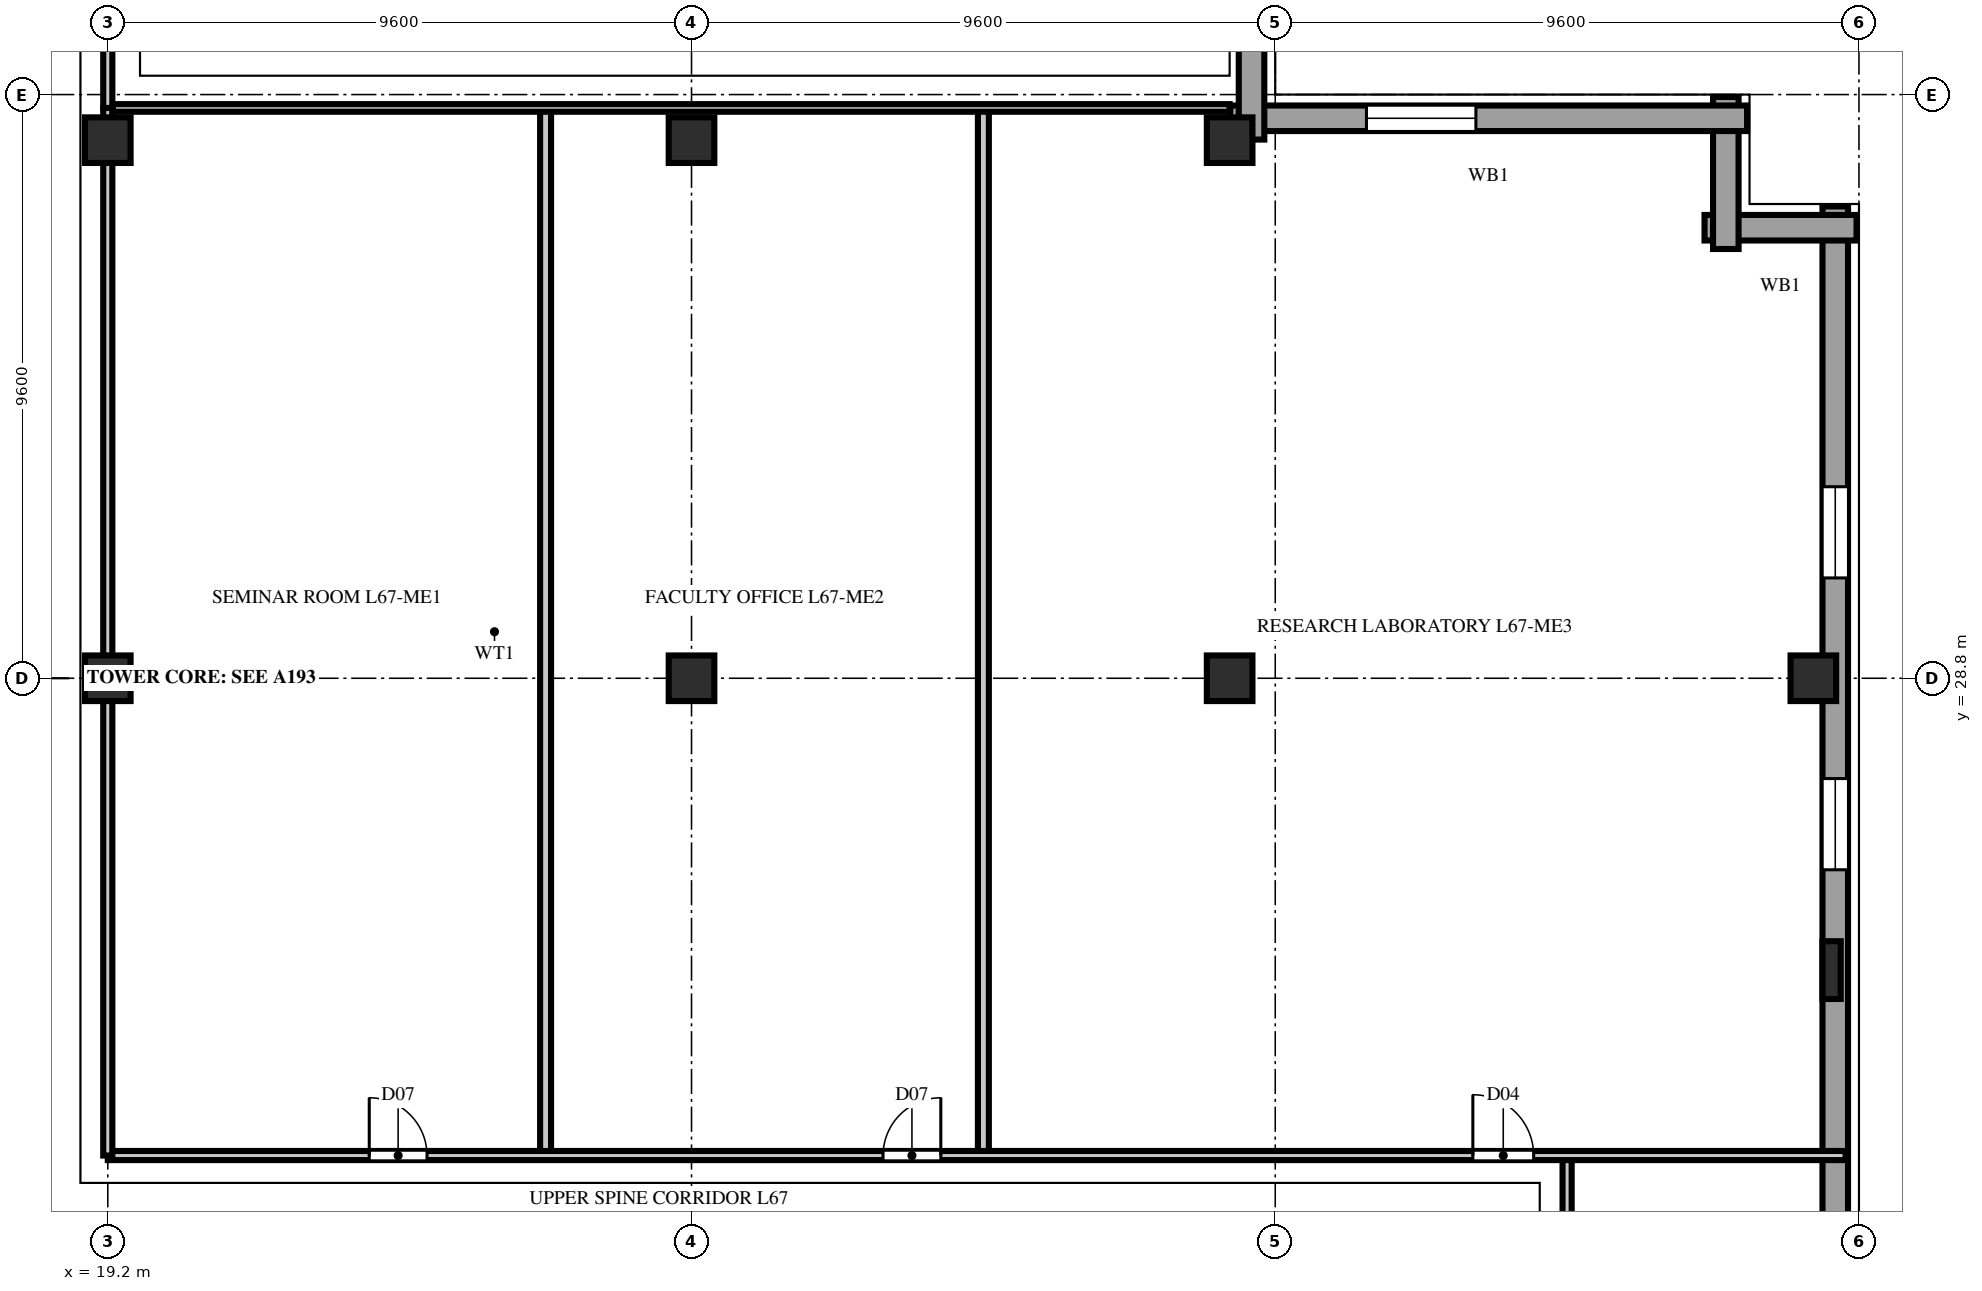
"""IFC4 building model, lengths in metres.
Left out: names, types, materials, properties, quantities, classifications, styles, units other than length and angle.
Written with IfcOpenShell. Run it as: python <this file> out.ifc"""

import sys

from ifc_helpers import new_model, si_unit, direction, frame, frame_2d, origin, origin_2d, place, context, subcontext, project, spatial, rectangle, extrude, element, fill, save


model = new_model("IFC4")
c1 = context("Model", 3, precision=1e-05, world=origin(), true_north=direction((0.0, 1.0)))
c2 = subcontext(c1, "Body", "Model", "MODEL_VIEW")
j1 = project(units=[si_unit("LENGTHUNIT", "METRE"), si_unit("PLANEANGLEUNIT", "RADIAN")], contexts=[c1])
p1 = place(None, origin())
s1 = spatial("IfcSite", under=j1, at=p1, CompositionType="ELEMENT")
p2 = place(p1, origin())
s2 = spatial("IfcBuilding", under=s1, at=p2, CompositionType="ELEMENT")
p3 = place(p2, frame((0.0, 0.0, 265.8)))
s3 = spatial("IfcBuildingStorey", under=s2, at=p3, CompositionType="ELEMENT", Elevation=265.8)
for number, where, z_axis, x_axis in (
    (1, (19.2, 28.8, 0.0), (0.0, 0.0, 1.0), (1.0, 0.0, 0.0)),
    (2, (19.2, 37.65, 0.0), (0.0, 0.0, 1.0), (1.0, 0.0, 0.0)),
    (3, (28.8, 28.8, 0.0), (0.0, 0.0, 1.0), (1.0, 0.0, 0.0)),
    (4, (28.8, 37.65, 0.0), (0.0, 0.0, 1.0), (1.0, 0.0, 0.0)),
    (5, (37.65, 28.8, 0.0), (0.0, 0.0, 1.0), (1.0, 0.0, 0.0)),
    (6, (37.65, 37.65, 0.0), (0.0, 0.0, 1.0), (1.0, 0.0, 0.0)),
    (7, (47.25, 28.8, 0.0), (0.0, 0.0, 1.0), (1.0, 0.0, 0.0)),
):
    element("IfcColumn", number, at=place(p3, frame(where, z_axis=z_axis, x_axis=x_axis)), inside=s3, PredefinedType="COLUMN", context=c2, shape_type="SweptSolid", body=[
        extrude(rectangle(XDim=0.75, YDim=0.75, at=origin_2d()), origin(), (0.0, 0.0, 1.0), 3.8),
    ])
p4 = place(p3, frame((47.55, 24.0, 0.0), z_axis=(0.0, 0.0, 1.0), x_axis=(0.0, 1.0, 0.0)))
e8 = element("IfcColumn", 8, at=p4, inside=s3, PredefinedType="PILASTER", context=c2, shape_type="SweptSolid", body=[
    extrude(rectangle(XDim=0.95, YDim=0.3, at=origin_2d()), origin(), (0.0, 0.0, 1.0), 3.8),
])
p5 = place(p3, frame((47.61, 1.84, 0.0), z_axis=(0.0, 0.0, 1.0), x_axis=(0.0, 1.0, 0.0)))
e9 = element("IfcWall", 9, at=p5, inside=s3, PredefinedType="SOLIDWALL", context=c2, shape_type="SweptSolid", body=[
    extrude(rectangle(XDim=34.72, YDim=0.42, at=frame_2d((17.36, 0.0))), origin(), (0.0, 0.0, 1.0), 3.54),
])
p6 = place(p5, frame((4.61, 0.0, 0.85)))
e10 = element("IfcOpeningElement", 10, at=p6, cuts=e9, PredefinedType="OPENING", context=c2, shape_type="SweptSolid", body=[
    extrude(rectangle(XDim=1.5, YDim=1.85, at=frame_2d((0.75, 0.925))), frame((0.0, 0.222, 0.0), z_axis=(0.0, -1.0, 0.0), x_axis=(1.0, 0.0, 0.0)), (0.0, 0.0, 1.0), 0.444),
])
p7 = place(p5, frame((9.41, 0.0, 0.85)))
e11 = element("IfcOpeningElement", 11, at=p7, cuts=e9, PredefinedType="OPENING", context=c2, shape_type="SweptSolid", body=[
    extrude(rectangle(XDim=1.5, YDim=1.85, at=frame_2d((0.75, 0.925))), frame((0.0, 0.222, 0.0), z_axis=(0.0, -1.0, 0.0), x_axis=(1.0, 0.0, 0.0)), (0.0, 0.0, 1.0), 0.444),
])
p8 = place(p5, frame((14.21, 0.0, 0.85)))
e12 = element("IfcOpeningElement", 12, at=p8, cuts=e9, PredefinedType="OPENING", context=c2, shape_type="SweptSolid", body=[
    extrude(rectangle(XDim=1.5, YDim=1.85, at=frame_2d((0.75, 0.925))), frame((0.0, 0.222, 0.0), z_axis=(0.0, -1.0, 0.0), x_axis=(1.0, 0.0, 0.0)), (0.0, 0.0, 1.0), 0.444),
])
p9 = place(p5, frame((23.81, 0.0, 0.85)))
e13 = element("IfcOpeningElement", 13, at=p9, cuts=e9, PredefinedType="OPENING", context=c2, shape_type="SweptSolid", body=[
    extrude(rectangle(XDim=1.5, YDim=1.85, at=frame_2d((0.75, 0.925))), frame((0.0, 0.222, 0.0), z_axis=(0.0, -1.0, 0.0), x_axis=(1.0, 0.0, 0.0)), (0.0, 0.0, 1.0), 0.444),
])
p10 = place(p5, frame((28.61, 0.0, 0.85)))
e14 = element("IfcOpeningElement", 14, at=p10, cuts=e9, PredefinedType="OPENING", context=c2, shape_type="SweptSolid", body=[
    extrude(rectangle(XDim=1.5, YDim=1.85, at=frame_2d((0.75, 0.925))), frame((0.0, 0.222, 0.0), z_axis=(0.0, -1.0, 0.0), x_axis=(1.0, 0.0, 0.0)), (0.0, 0.0, 1.0), 0.444),
])
for number, where, z_axis, x_axis in (
    (15, (47.96, 36.21, 0.0), (0.0, 0.0, 1.0), (-1.0, 0.0, 0.0)),
    (16, (45.81, 35.86, 0.0), (0.0, 0.0, 1.0), (0.0, 1.0, 0.0)),
):
    element("IfcWall", number, at=place(p3, frame(where, z_axis=z_axis, x_axis=x_axis)), inside=s3, PredefinedType="SOLIDWALL", context=c2, shape_type="SweptSolid", body=[
        extrude(rectangle(XDim=2.5, YDim=0.42, at=frame_2d((1.25, 0.0))), origin(), (0.0, 0.0, 1.0), 3.54),
    ])
p11 = place(p3, frame((46.16, 38.01, 0.0), z_axis=(0.0, 0.0, 1.0), x_axis=(-1.0, 0.0, 0.0)))
e17 = element("IfcWall", 17, at=p11, inside=s3, PredefinedType="SOLIDWALL", context=c2, shape_type="SweptSolid", body=[
    extrude(rectangle(XDim=8.5, YDim=0.42, at=frame_2d((4.25, 0.0))), origin(), (0.0, 0.0, 1.0), 3.54),
])
p12 = place(p11, frame((4.46, 0.0, 0.85)))
e18 = element("IfcOpeningElement", 18, at=p12, cuts=e17, PredefinedType="OPENING", context=c2, shape_type="SweptSolid", body=[
    extrude(rectangle(XDim=1.8, YDim=1.85, at=frame_2d((0.9, 0.925))), frame((0.0, 0.222, 0.0), z_axis=(0.0, -1.0, 0.0), x_axis=(1.0, 0.0, 0.0)), (0.0, 0.0, 1.0), 0.444),
])
p13 = place(p3, frame((38.01, 37.66, 0.0), z_axis=(0.0, 0.0, 1.0), x_axis=(0.0, 1.0, 0.0)))
e19 = element("IfcWall", 19, at=p13, inside=s3, PredefinedType="SOLIDWALL", context=c2, shape_type="SweptSolid", body=[
    extrude(rectangle(XDim=8.5, YDim=0.42, at=frame_2d((4.25, 0.0))), origin(), (0.0, 0.0, 1.0), 3.54),
])
p14 = place(p13, frame((2.24, 0.0, 0.85)))
e20 = element("IfcOpeningElement", 20, at=p14, cuts=e19, PredefinedType="OPENING", context=c2, shape_type="SweptSolid", body=[
    extrude(rectangle(XDim=1.8, YDim=1.85, at=frame_2d((0.9, 0.925))), frame((0.0, 0.222, 0.0), z_axis=(0.0, -1.0, 0.0), x_axis=(1.0, 0.0, 0.0)), (0.0, 0.0, 1.0), 0.444),
])
p15 = place(p3, frame((43.2, 18.1, 0.0), z_axis=(0.0, 0.0, 1.0), x_axis=(0.0, 1.0, 0.0)))
e21 = element("IfcWall", 21, at=p15, inside=s3, PredefinedType="PARTITIONING", context=c2, shape_type="SweptSolid", body=[
    extrude(rectangle(XDim=2.85, YDim=0.15, at=frame_2d((1.425, 0.0))), origin(), (0.0, 0.0, 1.0), 3.54),
])
for number, where, z_axis, x_axis in (
    (22, (26.4, 20.95, 0.0), (0.0, 0.0, 1.0), (0.0, 1.0, 0.0)),
    (23, (33.6, 20.95, 0.0), (0.0, 0.0, 1.0), (0.0, 1.0, 0.0)),
):
    element("IfcWall", number, at=place(p3, frame(where, z_axis=z_axis, x_axis=x_axis)), inside=s3, PredefinedType="PARTITIONING", context=c2, shape_type="SweptSolid", body=[
        extrude(rectangle(XDim=17.23, YDim=0.18, at=frame_2d((8.615, 0.0))), origin(), (0.0, 0.0, 1.0), 3.54),
    ])
p16 = place(p3, frame((19.2, 20.95, 0.0), z_axis=(0.0, 0.0, 1.0), x_axis=(1.0, 0.0, 0.0)))
e24 = element("IfcWall", 24, at=p16, inside=s3, PredefinedType="PARTITIONING", context=c2, shape_type="SweptSolid", body=[
    extrude(rectangle(XDim=28.58, YDim=0.15, at=frame_2d((14.29, 0.0))), origin(), (0.0, 0.0, 1.0), 3.54),
])
p17 = place(p16, frame((4.3, 0.0, 0.0)))
e25 = element("IfcOpeningElement", 25, at=p17, cuts=e24, PredefinedType="OPENING", context=c2, shape_type="SweptSolid", body=[
    extrude(rectangle(XDim=0.95, YDim=2.15, at=frame_2d((0.475, 1.075))), frame((0.0, 0.087, 0.0), z_axis=(0.0, -1.0, 0.0), x_axis=(1.0, 0.0, 0.0)), (0.0, 0.0, 1.0), 0.174),
])
p18 = place(p16, frame((12.75, 0.0, 0.0)))
e26 = element("IfcOpeningElement", 26, at=p18, cuts=e24, PredefinedType="OPENING", context=c2, shape_type="SweptSolid", body=[
    extrude(rectangle(XDim=0.95, YDim=2.15, at=frame_2d((0.475, 1.075))), frame((0.0, 0.087, 0.0), z_axis=(0.0, -1.0, 0.0), x_axis=(1.0, 0.0, 0.0)), (0.0, 0.0, 1.0), 0.174),
])
p19 = place(p16, frame((22.45, 0.0, 0.0)))
e27 = element("IfcOpeningElement", 27, at=p19, cuts=e24, PredefinedType="OPENING", context=c2, shape_type="SweptSolid", body=[
    extrude(rectangle(XDim=1.0, YDim=2.2, at=frame_2d((0.5, 1.1))), frame((0.0, 0.087, 0.0), z_axis=(0.0, -1.0, 0.0), x_axis=(1.0, 0.0, 0.0)), (0.0, 0.0, 1.0), 0.174),
])
p20 = place(p3, frame((19.2, 20.95, 0.0), z_axis=(0.0, 0.0, 1.0), x_axis=(0.0, 1.0, 0.0)))
e28 = element("IfcWall", 28, at=p20, inside=s3, PredefinedType="PARTITIONING", context=c2, shape_type="SweptSolid", body=[
    extrude(rectangle(XDim=17.23, YDim=0.15, at=frame_2d((8.615, 0.0))), origin(), (0.0, 0.0, 1.0), 3.123),
])
p21 = place(p3, frame((19.28, 38.18, 0.0), z_axis=(0.0, 0.0, 1.0), x_axis=(1.0, 0.0, 0.0)))
e29 = element("IfcWall", 29, at=p21, inside=s3, PredefinedType="PARTITIONING", context=c2, shape_type="SweptSolid", body=[
    extrude(rectangle(XDim=18.37, YDim=0.125, at=frame_2d((9.185, 0.0))), origin(), (0.0, 0.0, 1.0), 3.54),
])
p22 = place(p3, frame((19.2, 38.18, 0.0), z_axis=(0.0, 0.0, 1.0), x_axis=(0.0, 1.0, 0.0)))
e30 = element("IfcWall", 30, at=p22, inside=s3, PredefinedType="PARTITIONING", context=c2, shape_type="SweptSolid", body=[
    extrude(rectangle(XDim=9.27, YDim=0.15, at=frame_2d((4.635, 0.0))), origin(), (0.0, 0.0, 1.0), 3.123),
])
p23 = place(p22, frame((3.65, 0.0, 0.0)))
e31 = element("IfcOpeningElement", 31, at=p23, cuts=e30, PredefinedType="OPENING", context=c2, shape_type="SweptSolid", body=[
    extrude(rectangle(XDim=1.2, YDim=2.2, at=frame_2d((0.6, 1.1))), frame((0.0, 0.087, 0.0), z_axis=(0.0, -1.0, 0.0), x_axis=(1.0, 0.0, 0.0)), (0.0, 0.0, 1.0), 0.174),
])
p24 = place(p9, origin())
e32 = element("IfcWindow", 32, at=p24, inside=s3, PartitioningType="DOUBLE_PANEL_VERTICAL", PredefinedType="WINDOW", context=c2, shape_type="SweptSolid", body=[
    extrude(rectangle(XDim=1.5, YDim=1.85, at=frame_2d((0.75, 0.925))), frame((0.0, 0.11, 0.0), z_axis=(0.0, -1.0, 0.0), x_axis=(1.0, 0.0, 0.0)), (0.0, 0.0, 1.0), 0.06),
])
fill(e13, e32)
p25 = place(p10, origin())
e33 = element("IfcWindow", 33, at=p25, inside=s3, PartitioningType="DOUBLE_PANEL_VERTICAL", PredefinedType="WINDOW", context=c2, shape_type="SweptSolid", body=[
    extrude(rectangle(XDim=1.5, YDim=1.85, at=frame_2d((0.75, 0.925))), frame((0.0, 0.11, 0.0), z_axis=(0.0, -1.0, 0.0), x_axis=(1.0, 0.0, 0.0)), (0.0, 0.0, 1.0), 0.06),
])
fill(e14, e33)
p26 = place(p12, origin())
e34 = element("IfcWindow", 34, at=p26, inside=s3, PartitioningType="DOUBLE_PANEL_VERTICAL", PredefinedType="WINDOW", context=c2, shape_type="SweptSolid", body=[
    extrude(rectangle(XDim=1.8, YDim=1.85, at=frame_2d((0.9, 0.925))), frame((0.0, 0.11, 0.0), z_axis=(0.0, -1.0, 0.0), x_axis=(1.0, 0.0, 0.0)), (0.0, 0.0, 1.0), 0.06),
])
fill(e18, e34)
p27 = place(p17, origin())
e35 = element("IfcDoor", 35, at=p27, inside=s3, OperationType="SINGLE_SWING_LEFT", PredefinedType="DOOR", context=c2, shape_type="SweptSolid", body=[
    extrude(rectangle(XDim=0.95, YDim=2.15, at=frame_2d((0.475, 1.075))), frame((0.0, 0.025, 0.0), z_axis=(0.0, -1.0, 0.0), x_axis=(1.0, 0.0, 0.0)), (0.0, 0.0, 1.0), 0.05),
])
fill(e25, e35)
p28 = place(p18, origin())
e36 = element("IfcDoor", 36, at=p28, inside=s3, OperationType="SINGLE_SWING_RIGHT", PredefinedType="DOOR", context=c2, shape_type="SweptSolid", body=[
    extrude(rectangle(XDim=0.95, YDim=2.15, at=frame_2d((0.475, 1.075))), frame((0.0, 0.025, 0.0), z_axis=(0.0, -1.0, 0.0), x_axis=(1.0, 0.0, 0.0)), (0.0, 0.0, 1.0), 0.05),
])
fill(e26, e36)
p29 = place(p19, origin())
e37 = element("IfcDoor", 37, at=p29, inside=s3, OperationType="SINGLE_SWING_LEFT", PredefinedType="DOOR", context=c2, shape_type="SweptSolid", body=[
    extrude(rectangle(XDim=1.0, YDim=2.2, at=frame_2d((0.5, 1.1))), frame((0.0, 0.025, 0.0), z_axis=(0.0, -1.0, 0.0), x_axis=(1.0, 0.0, 0.0)), (0.0, 0.0, 1.0), 0.05),
])
fill(e27, e37)
save(model, sys.argv[1])
